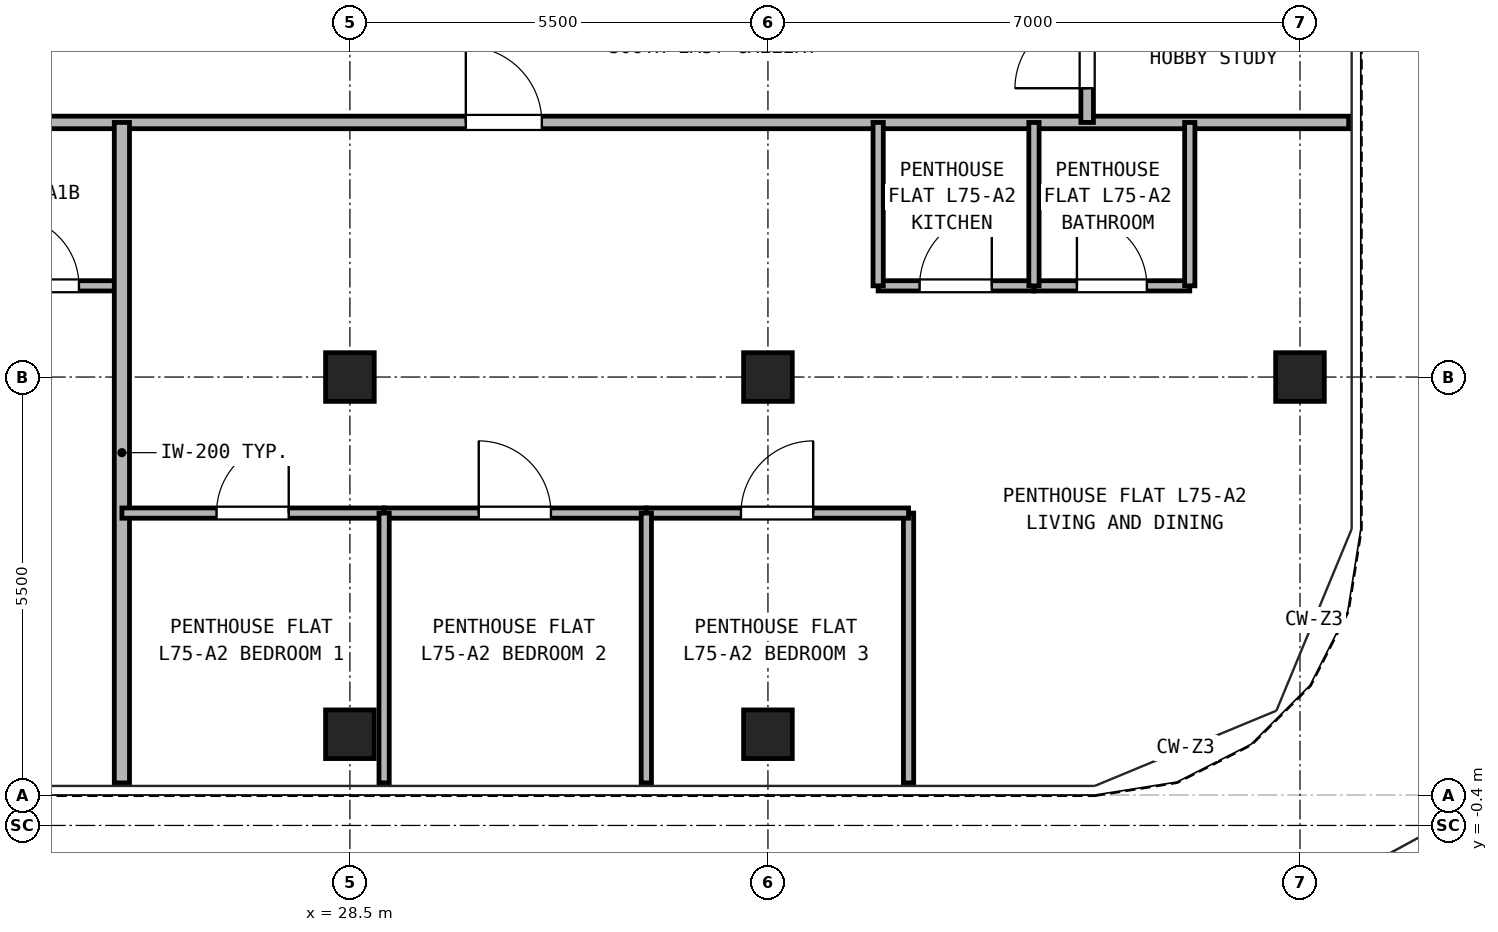
"""IFC4 building model, lengths in metres.
Left out: names, types, materials, properties, quantities, classifications, styles, units other than length and angle.
Written with IfcOpenShell. Run it as: python <this file> out.ifc"""

import sys

from ifc_helpers import new_model, si_unit, direction, frame, frame_2d, origin, origin_2d, place, context, subcontext, project, spatial, rectangle, hollow_rectangle, extrude, source, transform, mapped, element, fill, save


model = new_model("IFC4")
c1 = context("Model", 3, precision=1e-05, world=origin(), true_north=direction((0.0, 1.0)))
c2 = subcontext(c1, "Body", "Model", "MODEL_VIEW")
j1 = project(units=[si_unit("LENGTHUNIT", "METRE"), si_unit("PLANEANGLEUNIT", "RADIAN")], contexts=[c1])
p1 = place(None, origin())
s1 = spatial("IfcSite", under=j1, at=p1, CompositionType="ELEMENT")
p2 = place(p1, origin())
s2 = spatial("IfcBuilding", under=s1, at=p2, CompositionType="ELEMENT")
p3 = place(p2, frame((0.0, 0.0, 261.7)))
s3 = spatial("IfcBuildingStorey", under=s2, at=p3, CompositionType="ELEMENT", Elevation=261.7)
m1 = source(origin(), c2, "Body", "SweptSolid", [
    extrude(hollow_rectangle(XDim=0.64, YDim=0.64, WallThickness=0.035, at=origin_2d()), origin(), (0.0, 0.0, 1.0), 2.98),
])
for number, where, z_axis, x_axis in (
    (1, (28.5, 0.8, 0.0), (0.0, 0.0, 1.0), (1.0, 0.0, 0.0)),
    (2, (34.0, 0.8, 0.0), (0.0, 0.0, 1.0), (1.0, 0.0, 0.0)),
    (3, (41.0, 5.5, 0.0), (0.0, 0.0, 1.0), (1.0, 0.0, 0.0)),
    (4, (28.5, 5.5, 0.0), (0.0, 0.0, 1.0), (1.0, 0.0, 0.0)),
    (5, (34.0, 5.5, 0.0), (0.0, 0.0, 1.0), (1.0, 0.0, 0.0)),
):
    element("IfcColumn", number, at=place(p3, frame(where, z_axis=z_axis, x_axis=x_axis)), inside=s3, PredefinedType="COLUMN", context=c2, shape_type="MappedRepresentation", body=[
        mapped(m1, transform((0.0, 0.0, 0.0), x_axis=(1.0, 0.0, 0.0), y_axis=(0.0, 1.0, 0.0), z_axis=(0.0, 0.0, 1.0), scale=1.0)),
    ])
p4 = place(p3, frame((5.36, 8.85, 0.0), z_axis=(0.0, 0.0, 1.0), x_axis=(1.0, 0.0, 0.0)))
e6 = element("IfcWall", 6, at=p4, inside=s3, PredefinedType="PARTITIONING", context=c2, shape_type="SweptSolid", body=[
    extrude(rectangle(XDim=36.28, YDim=0.165, at=frame_2d((18.14, 0.0))), origin(), (0.0, 0.0, 1.0), 2.98),
])
p5 = place(p4, frame((9.17, 0.0, 0.0)))
e7 = element("IfcOpeningElement", 7, at=p5, cuts=e6, PredefinedType="OPENING", context=c2, shape_type="SweptSolid", body=[
    extrude(rectangle(XDim=1.0, YDim=2.15, at=frame_2d((0.5, 1.075))), frame((0.0, 0.093, 0.0), z_axis=(0.0, -1.0, 0.0), x_axis=(1.0, 0.0, 0.0)), (0.0, 0.0, 1.0), 0.185),
])
p6 = place(p4, frame((24.665, 0.0, 0.0)))
e8 = element("IfcOpeningElement", 8, at=p6, cuts=e6, PredefinedType="OPENING", context=c2, shape_type="SweptSolid", body=[
    extrude(rectangle(XDim=1.0, YDim=2.15, at=frame_2d((0.5, 1.075))), frame((0.0, 0.093, 0.0), z_axis=(0.0, -1.0, 0.0), x_axis=(1.0, 0.0, 0.0)), (0.0, 0.0, 1.0), 0.185),
])
p7 = place(p3, frame((38.2, 8.85, 0.0), z_axis=(0.0, 0.0, 1.0), x_axis=(0.0, 1.0, 0.0)))
e9 = element("IfcWall", 9, at=p7, inside=s3, PredefinedType="PARTITIONING", context=c2, shape_type="SweptSolid", body=[
    extrude(rectangle(XDim=2.0, YDim=0.165, at=frame_2d((1.0, 0.0))), origin(), (0.0, 0.0, 1.0), 2.98),
])
p8 = place(p7, frame((0.45, 0.0, 0.0)))
e10 = element("IfcOpeningElement", 10, at=p8, cuts=e9, PredefinedType="OPENING", context=c2, shape_type="SweptSolid", body=[
    extrude(rectangle(XDim=0.95, YDim=2.15, at=frame_2d((0.475, 1.075))), frame((0.0, 0.093, 0.0), z_axis=(0.0, -1.0, 0.0), x_axis=(1.0, 0.0, 0.0)), (0.0, 0.0, 1.0), 0.185),
])
p9 = place(p3, frame((23.45, 6.7, 0.0), z_axis=(0.0, 0.0, 1.0), x_axis=(1.0, 0.0, 0.0)))
e11 = element("IfcWall", 11, at=p9, inside=s3, PredefinedType="PARTITIONING", context=c2, shape_type="SweptSolid", body=[
    extrude(rectangle(XDim=2.05, YDim=0.135, at=frame_2d((1.025, 0.0))), origin(), (0.0, 0.0, 1.0), 2.98),
])
p10 = place(p9, frame((0.565, 0.0, 0.0)))
e12 = element("IfcOpeningElement", 12, at=p10, cuts=e11, PredefinedType="OPENING", context=c2, shape_type="SweptSolid", body=[
    extrude(rectangle(XDim=0.92, YDim=2.1, at=frame_2d((0.46, 1.05))), frame((0.0, 0.077, 0.0), z_axis=(0.0, -1.0, 0.0), x_axis=(1.0, 0.0, 0.0)), (0.0, 0.0, 1.0), 0.155),
])
p11 = place(p3, frame((25.5, 0.16, 0.0), z_axis=(0.0, 0.0, 1.0), x_axis=(0.0, 1.0, 0.0)))
e13 = element("IfcWall", 13, at=p11, inside=s3, PredefinedType="PARTITIONING", context=c2, shape_type="SweptSolid", body=[
    extrude(rectangle(XDim=8.69, YDim=0.2, at=frame_2d((4.345, 0.0))), origin(), (0.0, 0.0, 1.0), 2.98),
])
p12 = place(p3, frame((35.45, 6.7, 0.0), z_axis=(0.0, 0.0, 1.0), x_axis=(1.0, 0.0, 0.0)))
e14 = element("IfcWall", 14, at=p12, inside=s3, PredefinedType="PARTITIONING", context=c2, shape_type="SweptSolid", body=[
    extrude(rectangle(XDim=2.05, YDim=0.135, at=frame_2d((1.025, 0.0))), origin(), (0.0, 0.0, 1.0), 2.98),
])
p13 = place(p12, frame((0.545, 0.0, 0.0)))
e15 = element("IfcOpeningElement", 15, at=p13, cuts=e14, PredefinedType="OPENING", context=c2, shape_type="SweptSolid", body=[
    extrude(rectangle(XDim=0.95, YDim=2.15, at=frame_2d((0.475, 1.075))), frame((0.0, 0.077, 0.0), z_axis=(0.0, -1.0, 0.0), x_axis=(1.0, 0.0, 0.0)), (0.0, 0.0, 1.0), 0.155),
])
p14 = place(p3, frame((37.5, 6.7, 0.0), z_axis=(0.0, 0.0, 1.0), x_axis=(1.0, 0.0, 0.0)))
e16 = element("IfcWall", 16, at=p14, inside=s3, PredefinedType="PARTITIONING", context=c2, shape_type="SweptSolid", body=[
    extrude(rectangle(XDim=2.05, YDim=0.135, at=frame_2d((1.025, 0.0))), origin(), (0.0, 0.0, 1.0), 2.98),
])
p15 = place(p14, frame((0.565, 0.0, 0.0)))
e17 = element("IfcOpeningElement", 17, at=p15, cuts=e16, PredefinedType="OPENING", context=c2, shape_type="SweptSolid", body=[
    extrude(rectangle(XDim=0.92, YDim=2.1, at=frame_2d((0.46, 1.05))), frame((0.0, 0.077, 0.0), z_axis=(0.0, -1.0, 0.0), x_axis=(1.0, 0.0, 0.0)), (0.0, 0.0, 1.0), 0.155),
])
for number, where, z_axis, x_axis in (
    (18, (35.45, 6.7, 0.0), (0.0, 0.0, 1.0), (0.0, 1.0, 0.0)),
    (19, (37.5, 6.7, 0.0), (0.0, 0.0, 1.0), (0.0, 1.0, 0.0)),
    (20, (39.55, 6.7, 0.0), (0.0, 0.0, 1.0), (0.0, 1.0, 0.0)),
):
    element("IfcWall", number, at=place(p3, frame(where, z_axis=z_axis, x_axis=x_axis)), inside=s3, PredefinedType="PARTITIONING", context=c2, shape_type="SweptSolid", body=[
        extrude(rectangle(XDim=2.15, YDim=0.135, at=frame_2d((1.075, 0.0))), origin(), (0.0, 0.0, 1.0), 2.98),
    ])
p16 = place(p3, frame((35.85, 0.16, 0.0), z_axis=(0.0, 0.0, 1.0), x_axis=(0.0, 1.0, 0.0)))
e21 = element("IfcWall", 21, at=p16, inside=s3, PredefinedType="PARTITIONING", context=c2, shape_type="SweptSolid", body=[
    extrude(rectangle(XDim=3.55, YDim=0.135, at=frame_2d((1.775, 0.0))), origin(), (0.0, 0.0, 1.0), 2.98),
])
p17 = place(p3, frame((25.5, 3.71, 0.0), z_axis=(0.0, 0.0, 1.0), x_axis=(1.0, 0.0, 0.0)))
e22 = element("IfcWall", 22, at=p17, inside=s3, PredefinedType="PARTITIONING", context=c2, shape_type="SweptSolid", body=[
    extrude(rectangle(XDim=3.45, YDim=0.135, at=frame_2d((1.725, 0.0))), origin(), (0.0, 0.0, 1.0), 2.98),
])
p18 = place(p17, frame((1.245, 0.0, 0.0)))
e23 = element("IfcOpeningElement", 23, at=p18, cuts=e22, PredefinedType="OPENING", context=c2, shape_type="SweptSolid", body=[
    extrude(rectangle(XDim=0.95, YDim=2.15, at=frame_2d((0.475, 1.075))), frame((0.0, 0.077, 0.0), z_axis=(0.0, -1.0, 0.0), x_axis=(1.0, 0.0, 0.0)), (0.0, 0.0, 1.0), 0.155),
])
p19 = place(p3, frame((28.95, 3.71, 0.0), z_axis=(0.0, 0.0, 1.0), x_axis=(1.0, 0.0, 0.0)))
e24 = element("IfcWall", 24, at=p19, inside=s3, PredefinedType="PARTITIONING", context=c2, shape_type="SweptSolid", body=[
    extrude(rectangle(XDim=3.45, YDim=0.135, at=frame_2d((1.725, 0.0))), origin(), (0.0, 0.0, 1.0), 2.98),
])
p20 = place(p19, frame((1.245, 0.0, 0.0)))
e25 = element("IfcOpeningElement", 25, at=p20, cuts=e24, PredefinedType="OPENING", context=c2, shape_type="SweptSolid", body=[
    extrude(rectangle(XDim=0.95, YDim=2.15, at=frame_2d((0.475, 1.075))), frame((0.0, 0.077, 0.0), z_axis=(0.0, -1.0, 0.0), x_axis=(1.0, 0.0, 0.0)), (0.0, 0.0, 1.0), 0.155),
])
p21 = place(p3, frame((28.95, 0.16, 0.0), z_axis=(0.0, 0.0, 1.0), x_axis=(0.0, 1.0, 0.0)))
e26 = element("IfcWall", 26, at=p21, inside=s3, PredefinedType="PARTITIONING", context=c2, shape_type="SweptSolid", body=[
    extrude(rectangle(XDim=3.55, YDim=0.135, at=frame_2d((1.775, 0.0))), origin(), (0.0, 0.0, 1.0), 2.98),
])
p22 = place(p3, frame((32.4, 3.71, 0.0), z_axis=(0.0, 0.0, 1.0), x_axis=(1.0, 0.0, 0.0)))
e27 = element("IfcWall", 27, at=p22, inside=s3, PredefinedType="PARTITIONING", context=c2, shape_type="SweptSolid", body=[
    extrude(rectangle(XDim=3.45, YDim=0.135, at=frame_2d((1.725, 0.0))), origin(), (0.0, 0.0, 1.0), 2.98),
])
p23 = place(p22, frame((1.245, 0.0, 0.0)))
e28 = element("IfcOpeningElement", 28, at=p23, cuts=e27, PredefinedType="OPENING", context=c2, shape_type="SweptSolid", body=[
    extrude(rectangle(XDim=0.95, YDim=2.15, at=frame_2d((0.475, 1.075))), frame((0.0, 0.077, 0.0), z_axis=(0.0, -1.0, 0.0), x_axis=(1.0, 0.0, 0.0)), (0.0, 0.0, 1.0), 0.155),
])
p24 = place(p3, frame((32.4, 0.16, 0.0), z_axis=(0.0, 0.0, 1.0), x_axis=(0.0, 1.0, 0.0)))
e29 = element("IfcWall", 29, at=p24, inside=s3, PredefinedType="PARTITIONING", context=c2, shape_type="SweptSolid", body=[
    extrude(rectangle(XDim=3.55, YDim=0.135, at=frame_2d((1.775, 0.0))), origin(), (0.0, 0.0, 1.0), 2.98),
])
p25 = place(p10, origin())
e30 = element("IfcDoor", 30, at=p25, inside=s3, OperationType="SINGLE_SWING_LEFT", PredefinedType="DOOR", context=c2, shape_type="SweptSolid", body=[
    extrude(rectangle(XDim=0.92, YDim=2.1, at=frame_2d((0.46, 1.05))), frame((0.0, 0.025, 0.0), z_axis=(0.0, -1.0, 0.0), x_axis=(1.0, 0.0, 0.0)), (0.0, 0.0, 1.0), 0.05),
])
fill(e12, e30)
p26 = place(p13, origin())
e31 = element("IfcDoor", 31, at=p26, inside=s3, OperationType="SINGLE_SWING_RIGHT", PredefinedType="DOOR", context=c2, shape_type="SweptSolid", body=[
    extrude(rectangle(XDim=0.95, YDim=2.15, at=frame_2d((0.475, 1.075))), frame((0.0, 0.025, 0.0), z_axis=(0.0, -1.0, 0.0), x_axis=(1.0, 0.0, 0.0)), (0.0, 0.0, 1.0), 0.05),
])
fill(e15, e31)
p27 = place(p15, origin())
e32 = element("IfcDoor", 32, at=p27, inside=s3, OperationType="SINGLE_SWING_LEFT", PredefinedType="DOOR", context=c2, shape_type="SweptSolid", body=[
    extrude(rectangle(XDim=0.92, YDim=2.1, at=frame_2d((0.46, 1.05))), frame((0.0, 0.025, 0.0), z_axis=(0.0, -1.0, 0.0), x_axis=(1.0, 0.0, 0.0)), (0.0, 0.0, 1.0), 0.05),
])
fill(e17, e32)
p28 = place(p18, frame((0.95, 0.0, 0.0), z_axis=(0.0, 0.0, 1.0), x_axis=(-1.0, 0.0, 0.0)))
e33 = element("IfcDoor", 33, at=p28, inside=s3, OperationType="SINGLE_SWING_RIGHT", PredefinedType="DOOR", context=c2, shape_type="SweptSolid", body=[
    extrude(rectangle(XDim=0.95, YDim=2.15, at=frame_2d((0.475, 1.075))), frame((0.0, 0.025, 0.0), z_axis=(0.0, -1.0, 0.0), x_axis=(1.0, 0.0, 0.0)), (0.0, 0.0, 1.0), 0.05),
])
fill(e23, e33)
p29 = place(p20, frame((0.95, 0.0, 0.0), z_axis=(0.0, 0.0, 1.0), x_axis=(-1.0, 0.0, 0.0)))
e34 = element("IfcDoor", 34, at=p29, inside=s3, OperationType="SINGLE_SWING_LEFT", PredefinedType="DOOR", context=c2, shape_type="SweptSolid", body=[
    extrude(rectangle(XDim=0.95, YDim=2.15, at=frame_2d((0.475, 1.075))), frame((0.0, 0.025, 0.0), z_axis=(0.0, -1.0, 0.0), x_axis=(1.0, 0.0, 0.0)), (0.0, 0.0, 1.0), 0.05),
])
fill(e25, e34)
p30 = place(p23, frame((0.95, 0.0, 0.0), z_axis=(0.0, 0.0, 1.0), x_axis=(-1.0, 0.0, 0.0)))
e35 = element("IfcDoor", 35, at=p30, inside=s3, OperationType="SINGLE_SWING_RIGHT", PredefinedType="DOOR", context=c2, shape_type="SweptSolid", body=[
    extrude(rectangle(XDim=0.95, YDim=2.15, at=frame_2d((0.475, 1.075))), frame((0.0, 0.025, 0.0), z_axis=(0.0, -1.0, 0.0), x_axis=(1.0, 0.0, 0.0)), (0.0, 0.0, 1.0), 0.05),
])
fill(e28, e35)
p31 = place(p6, frame((1.0, 0.0, 0.0), z_axis=(0.0, 0.0, 1.0), x_axis=(-1.0, 0.0, 0.0)))
e36 = element("IfcDoor", 36, at=p31, inside=s3, OperationType="SINGLE_SWING_LEFT", PredefinedType="DOOR", context=c2, shape_type="SweptSolid", body=[
    extrude(rectangle(XDim=1.0, YDim=2.15, at=frame_2d((0.5, 1.075))), frame((0.0, 0.025, 0.0), z_axis=(0.0, -1.0, 0.0), x_axis=(1.0, 0.0, 0.0)), (0.0, 0.0, 1.0), 0.05),
])
fill(e8, e36)
p32 = place(p8, origin())
e37 = element("IfcDoor", 37, at=p32, inside=s3, OperationType="SINGLE_SWING_LEFT", PredefinedType="DOOR", context=c2, shape_type="SweptSolid", body=[
    extrude(rectangle(XDim=0.95, YDim=2.15, at=frame_2d((0.475, 1.075))), frame((0.0, 0.025, 0.0), z_axis=(0.0, -1.0, 0.0), x_axis=(1.0, 0.0, 0.0)), (0.0, 0.0, 1.0), 0.05),
])
fill(e10, e37)
save(model, sys.argv[1])
